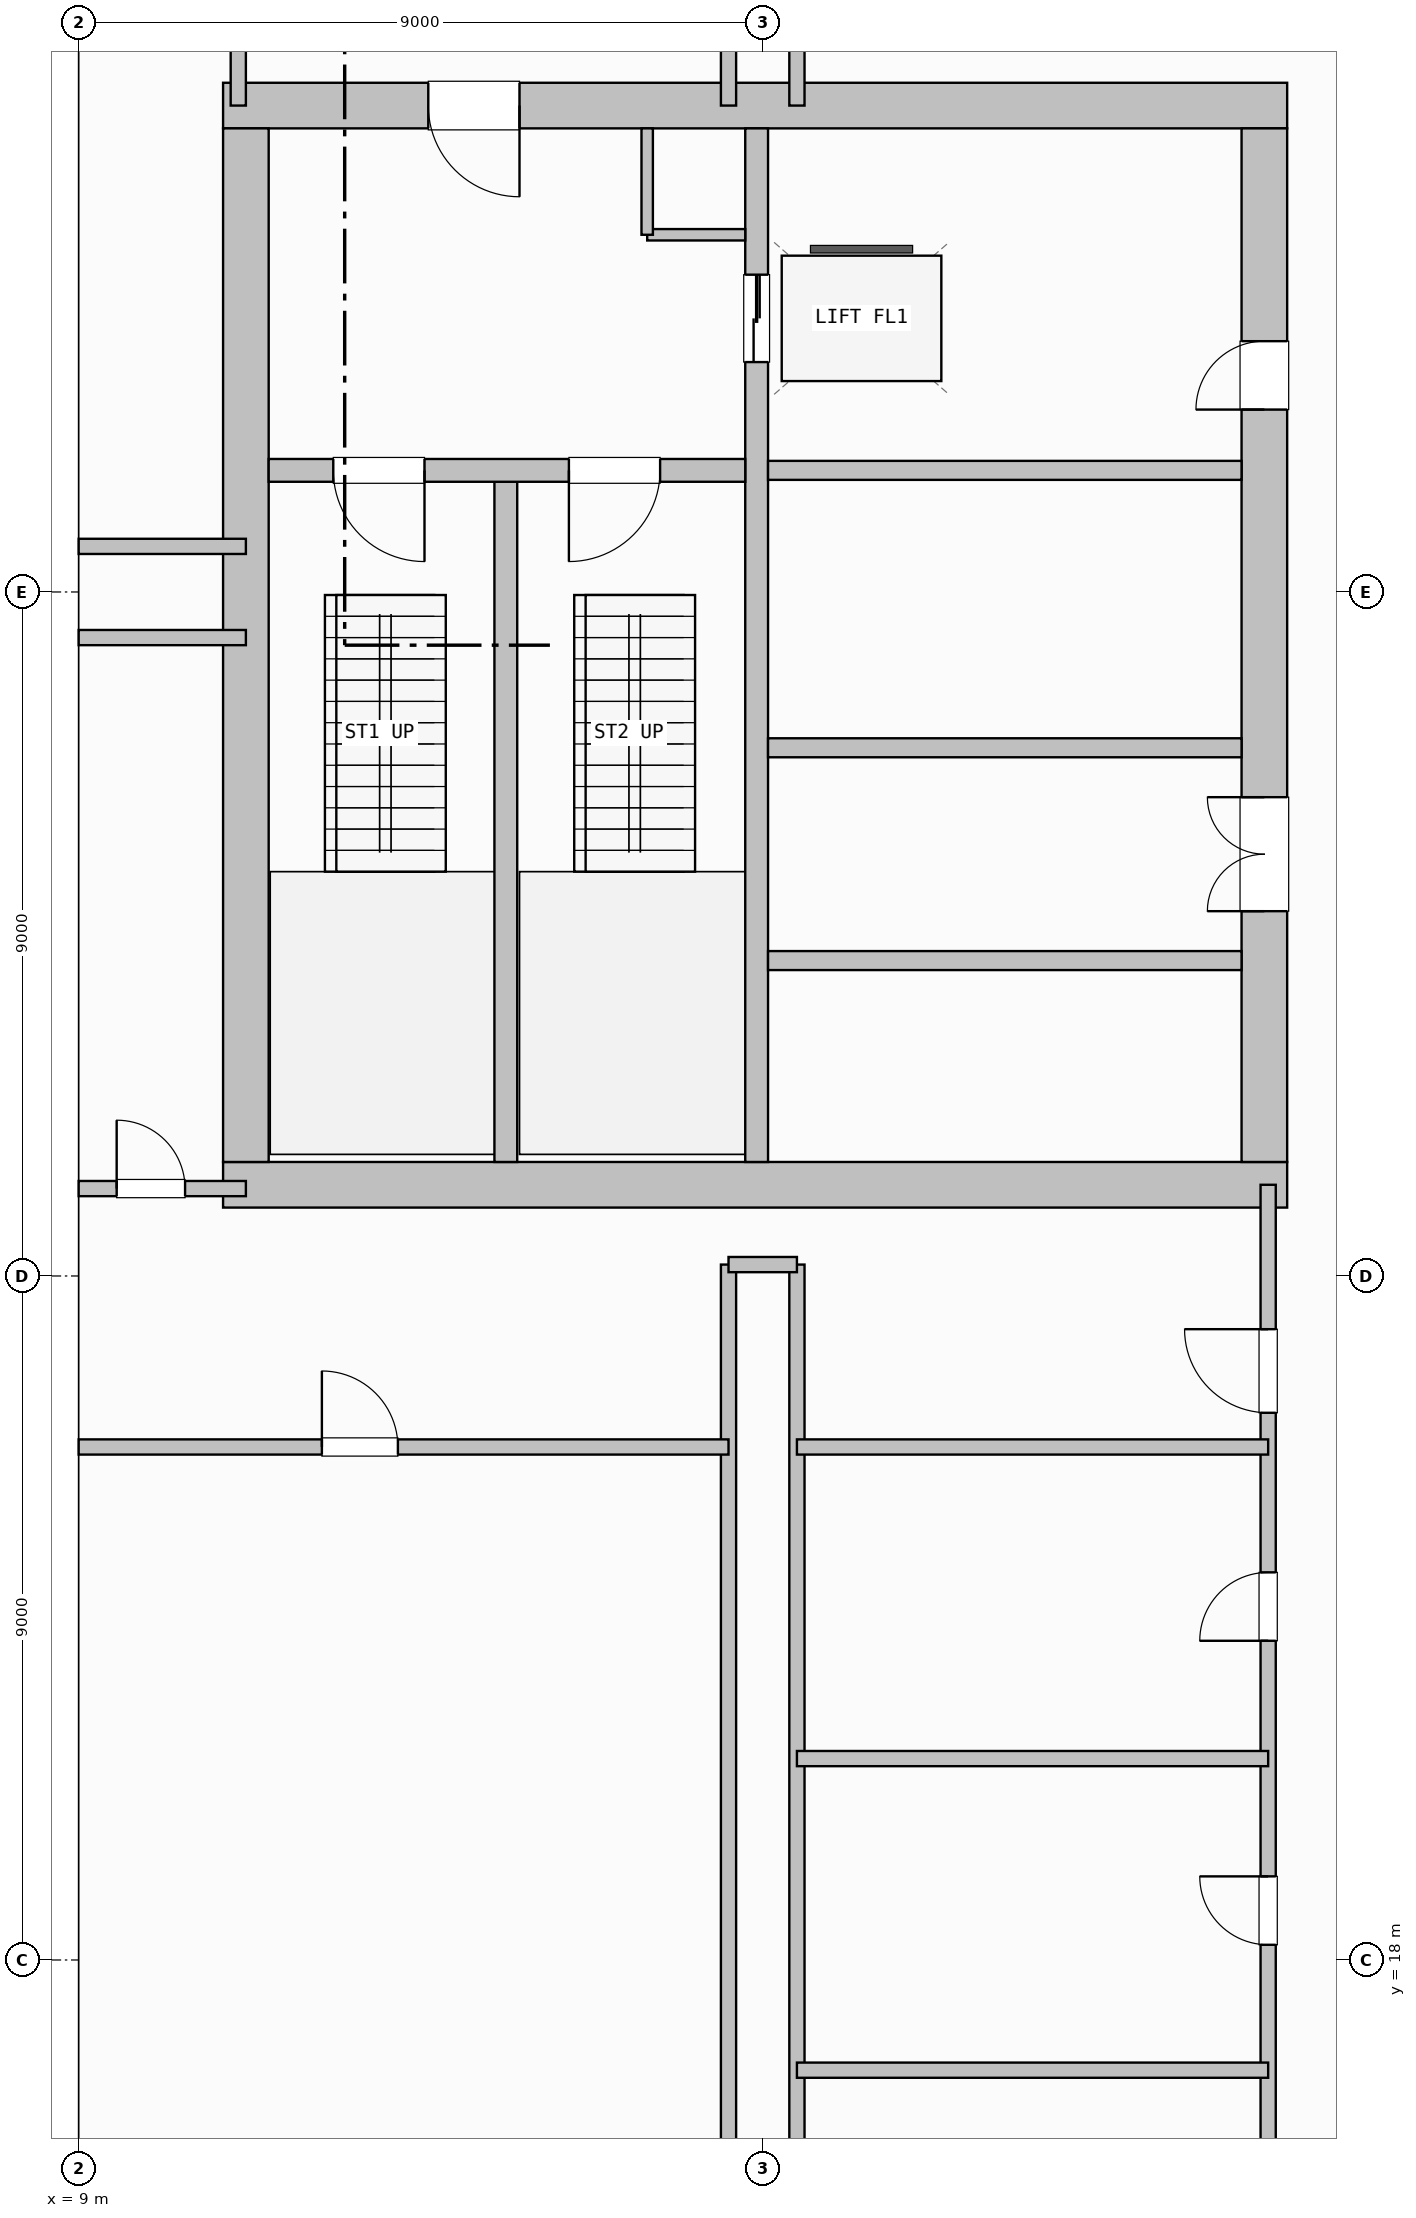
"""IFC4 building model, lengths in metres.
Left out: names, types, materials, properties, quantities, classifications, styles, units other than length and angle.
Written with IfcOpenShell. Run it as: python <this file> out.ifc"""

import sys

from ifc_helpers import new_model, si_unit, direction, frame, frame_2d, origin, origin_2d, place, context, subcontext, project, spatial, rectangle, i_section, extrude, element, fill, save


model = new_model("IFC4")
c1 = context("Model", 3, precision=1e-05, world=origin(), true_north=direction((0.0, 1.0)))
c2 = subcontext(c1, "Body", "Model", "MODEL_VIEW")
j1 = project(units=[si_unit("LENGTHUNIT", "METRE"), si_unit("PLANEANGLEUNIT", "RADIAN")], contexts=[c1])
p1 = place(None, origin())
s1 = spatial("IfcSite", under=j1, at=p1, CompositionType="ELEMENT")
p2 = place(p1, origin())
s2 = spatial("IfcBuilding", under=s1, at=p2, CompositionType="ELEMENT")
p3 = place(p2, frame((0.0, 0.0, 100.2)))
s3 = spatial("IfcBuildingStorey", under=s2, at=p3, CompositionType="ELEMENT", Elevation=100.2)
for number, where, z_axis, x_axis in (
    (1, (9.0, 18.0, 0.0), (0.0, 0.0, 1.0), (1.0, 0.0, 0.0)),
    (2, (9.0, 27.0, 0.0), (0.0, 0.0, 1.0), (1.0, 0.0, 0.0)),
    (3, (9.0, 36.0, 0.0), (0.0, 0.0, 1.0), (1.0, 0.0, 0.0)),
    (4, (18.0, 18.0, 0.0), (0.0, 0.0, 1.0), (1.0, 0.0, 0.0)),
    (5, (18.0, 27.0, 0.0), (0.0, 0.0, 1.0), (1.0, 0.0, 0.0)),
):
    element("IfcColumn", number, at=place(p3, frame(where, z_axis=z_axis, x_axis=x_axis)), inside=s3, PredefinedType="COLUMN", context=c2, shape_type="SweptSolid", body=[
        extrude(i_section(OverallWidth=0.424, OverallDepth=0.474, WebThickness=0.048, FlangeThickness=0.077, FilletRadius=0.015, at=origin_2d()), origin(), (0.0, 0.0, 1.0), 4.8),
    ])
p4 = place(p3, frame((10.9, 28.2, 0.0), z_axis=(0.0, 0.0, 1.0), x_axis=(1.0, 0.0, 0.0)))
e6 = element("IfcWall", 6, at=p4, inside=s3, PredefinedType="SHEAR", context=c2, shape_type="SweptSolid", body=[
    extrude(rectangle(XDim=14.0, YDim=0.6, at=frame_2d((7.0, 0.0))), origin(), (0.0, 0.0, 1.0), 4.47),
])
p5 = place(p3, frame((24.9, 42.4, 0.0), z_axis=(0.0, 0.0, 1.0), x_axis=(-1.0, 0.0, 0.0)))
e7 = element("IfcWall", 7, at=p5, inside=s3, PredefinedType="SHEAR", context=c2, shape_type="SweptSolid", body=[
    extrude(rectangle(XDim=14.0, YDim=0.6, at=frame_2d((7.0, 0.0))), origin(), (0.0, 0.0, 1.0), 4.47),
])
p6 = place(p5, frame((10.1, 0.0, 0.0)))
e8 = element("IfcOpeningElement", 8, at=p6, cuts=e7, PredefinedType="OPENING", context=c2, shape_type="SweptSolid", body=[
    extrude(rectangle(XDim=1.2, YDim=2.15, at=frame_2d((0.6, 1.075))), frame((0.0, 0.31, 0.0), z_axis=(0.0, -1.0, 0.0), x_axis=(1.0, 0.0, 0.0)), (0.0, 0.0, 1.0), 0.62),
])
p7 = place(p3, frame((11.2, 42.1, 0.0), z_axis=(0.0, 0.0, 1.0), x_axis=(0.0, -1.0, 0.0)))
e9 = element("IfcWall", 9, at=p7, inside=s3, PredefinedType="SHEAR", context=c2, shape_type="SweptSolid", body=[
    extrude(rectangle(XDim=13.6, YDim=0.6, at=frame_2d((6.8, 0.0))), origin(), (0.0, 0.0, 1.0), 4.47),
])
p8 = place(p3, frame((24.6, 28.5, 0.0), z_axis=(0.0, 0.0, 1.0), x_axis=(0.0, 1.0, 0.0)))
e10 = element("IfcWall", 10, at=p8, inside=s3, PredefinedType="SHEAR", context=c2, shape_type="SweptSolid", body=[
    extrude(rectangle(XDim=13.6, YDim=0.6, at=frame_2d((6.8, 0.0))), origin(), (0.0, 0.0, 1.0), 4.47),
])
p9 = place(p8, frame((3.3, 0.0, 0.0)))
e11 = element("IfcOpeningElement", 11, at=p9, cuts=e10, PredefinedType="OPENING", context=c2, shape_type="SweptSolid", body=[
    extrude(rectangle(XDim=1.5, YDim=2.2, at=frame_2d((0.75, 1.1))), frame((0.0, 0.31, 0.0), z_axis=(0.0, -1.0, 0.0), x_axis=(1.0, 0.0, 0.0)), (0.0, 0.0, 1.0), 0.62),
])
p10 = place(p8, frame((9.9, 0.0, 0.0)))
e12 = element("IfcOpeningElement", 12, at=p10, cuts=e10, PredefinedType="OPENING", context=c2, shape_type="SweptSolid", body=[
    extrude(rectangle(XDim=0.9, YDim=2.1, at=frame_2d((0.45, 1.05))), frame((0.0, 0.31, 0.0), z_axis=(0.0, -1.0, 0.0), x_axis=(1.0, 0.0, 0.0)), (0.0, 0.0, 1.0), 0.62),
])
p11 = place(p3, frame((14.62, 28.5, 0.0), z_axis=(0.0, 0.0, 1.0), x_axis=(0.0, 1.0, 0.0)))
e13 = element("IfcWall", 13, at=p11, inside=s3, PredefinedType="SHEAR", context=c2, shape_type="SweptSolid", body=[
    extrude(rectangle(XDim=8.95, YDim=0.3, at=frame_2d((4.475, 0.0))), origin(), (0.0, 0.0, 1.0), 4.47),
])
p12 = place(p3, frame((17.92, 42.1, 0.0), z_axis=(0.0, 0.0, 1.0), x_axis=(0.0, -1.0, 0.0)))
e14 = element("IfcWall", 14, at=p12, inside=s3, PredefinedType="SHEAR", context=c2, shape_type="SweptSolid", body=[
    extrude(rectangle(XDim=13.6, YDim=0.3, at=frame_2d((6.8, 0.0))), origin(), (0.0, 0.0, 1.0), 4.47),
])
p13 = place(p12, frame((1.925, 0.0, 0.0)))
e15 = element("IfcOpeningElement", 15, at=p13, cuts=e14, PredefinedType="OPENING", context=c2, shape_type="SweptSolid", body=[
    extrude(rectangle(XDim=1.15, YDim=2.15, at=frame_2d((0.575, 1.075))), frame((0.0, 0.16, 0.0), z_axis=(0.0, -1.0, 0.0), x_axis=(1.0, 0.0, 0.0)), (0.0, 0.0, 1.0), 0.32),
])
p14 = place(p3, frame((17.77, 37.6, 0.0), z_axis=(0.0, 0.0, 1.0), x_axis=(-1.0, 0.0, 0.0)))
e16 = element("IfcWall", 16, at=p14, inside=s3, PredefinedType="SHEAR", context=c2, shape_type="SweptSolid", body=[
    extrude(rectangle(XDim=6.27, YDim=0.3, at=frame_2d((3.135, 0.0))), origin(), (0.0, 0.0, 1.0), 4.47),
])
p15 = place(p14, frame((4.22, 0.0, 0.0)))
e17 = element("IfcOpeningElement", 17, at=p15, cuts=e16, PredefinedType="OPENING", context=c2, shape_type="SweptSolid", body=[
    extrude(rectangle(XDim=1.2, YDim=2.15, at=frame_2d((0.6, 1.075))), frame((0.0, 0.16, 0.0), z_axis=(0.0, -1.0, 0.0), x_axis=(1.0, 0.0, 0.0)), (0.0, 0.0, 1.0), 0.32),
])
p16 = place(p14, frame((1.12, 0.0, 0.0)))
e18 = element("IfcOpeningElement", 18, at=p16, cuts=e16, PredefinedType="OPENING", context=c2, shape_type="SweptSolid", body=[
    extrude(rectangle(XDim=1.2, YDim=2.15, at=frame_2d((0.6, 1.075))), frame((0.0, 0.16, 0.0), z_axis=(0.0, -1.0, 0.0), x_axis=(1.0, 0.0, 0.0)), (0.0, 0.0, 1.0), 0.32),
])
p17 = place(p3, frame((16.48, 40.7, 0.0), z_axis=(0.0, 0.0, 1.0), x_axis=(1.0, 0.0, 0.0)))
e19 = element("IfcWall", 19, at=p17, inside=s3, PredefinedType="PARTITIONING", context=c2, shape_type="SweptSolid", body=[
    extrude(rectangle(XDim=1.29, YDim=0.15, at=frame_2d((0.645, 0.0))), origin(), (0.0, 0.0, 1.0), 4.47),
])
p18 = place(p3, frame((16.48, 40.7, 0.0), z_axis=(0.0, 0.0, 1.0), x_axis=(0.0, 1.0, 0.0)))
e20 = element("IfcWall", 20, at=p18, inside=s3, PredefinedType="PARTITIONING", context=c2, shape_type="SweptSolid", body=[
    extrude(rectangle(XDim=1.4, YDim=0.15, at=frame_2d((0.7, 0.0))), origin(), (0.0, 0.0, 1.0), 4.47),
])
for number, where, z_axis, x_axis in (
    (21, (18.07, 37.6, 0.0), (0.0, 0.0, 1.0), (1.0, 0.0, 0.0)),
    (22, (18.07, 31.15, 0.0), (0.0, 0.0, 1.0), (1.0, 0.0, 0.0)),
    (23, (24.3, 33.95, 0.0), (0.0, 0.0, 1.0), (-1.0, 0.0, 0.0)),
):
    element("IfcWall", number, at=place(p3, frame(where, z_axis=z_axis, x_axis=x_axis)), inside=s3, PredefinedType="PARTITIONING", context=c2, shape_type="SweptSolid", body=[
        extrude(rectangle(XDim=6.23, YDim=0.25, at=frame_2d((3.115, 0.0))), origin(), (0.0, 0.0, 1.0), 4.47),
    ])
p19 = place(p3, frame((24.65, 9.0, 0.0), z_axis=(0.0, 0.0, 1.0), x_axis=(0.0, 1.0, 0.0)))
e24 = element("IfcWall", 24, at=p19, inside=s3, PredefinedType="PARTITIONING", context=c2, shape_type="SweptSolid", body=[
    extrude(rectangle(XDim=19.2, YDim=0.2, at=frame_2d((9.6, 0.0))), origin(), (0.0, 0.0, 1.0), 3.677),
])
p20 = place(p19, frame((4.2, 0.0, 0.0)))
e25 = element("IfcOpeningElement", 25, at=p20, cuts=e24, PredefinedType="OPENING", context=c2, shape_type="SweptSolid", body=[
    extrude(rectangle(XDim=1.1, YDim=2.15, at=frame_2d((0.55, 1.075))), frame((0.0, 0.11, 0.0), z_axis=(0.0, -1.0, 0.0), x_axis=(1.0, 0.0, 0.0)), (0.0, 0.0, 1.0), 0.22),
])
p21 = place(p19, frame((16.2, 0.0, 0.0)))
e26 = element("IfcOpeningElement", 26, at=p21, cuts=e24, PredefinedType="OPENING", context=c2, shape_type="SweptSolid", body=[
    extrude(rectangle(XDim=1.1, YDim=2.15, at=frame_2d((0.55, 1.075))), frame((0.0, 0.11, 0.0), z_axis=(0.0, -1.0, 0.0), x_axis=(1.0, 0.0, 0.0)), (0.0, 0.0, 1.0), 0.22),
])
p22 = place(p19, frame((9.2, 0.0, 0.0)))
e27 = element("IfcOpeningElement", 27, at=p22, cuts=e24, PredefinedType="OPENING", context=c2, shape_type="SweptSolid", body=[
    extrude(rectangle(XDim=0.9, YDim=2.1, at=frame_2d((0.45, 1.05))), frame((0.0, 0.11, 0.0), z_axis=(0.0, -1.0, 0.0), x_axis=(1.0, 0.0, 0.0)), (0.0, 0.0, 1.0), 0.22),
])
p23 = place(p19, frame((13.2, 0.0, 0.0)))
e28 = element("IfcOpeningElement", 28, at=p23, cuts=e24, PredefinedType="OPENING", context=c2, shape_type="SweptSolid", body=[
    extrude(rectangle(XDim=0.9, YDim=2.1, at=frame_2d((0.45, 1.05))), frame((0.0, 0.11, 0.0), z_axis=(0.0, -1.0, 0.0), x_axis=(1.0, 0.0, 0.0)), (0.0, 0.0, 1.0), 0.22),
])
p24 = place(p3, frame((17.55, 9.0, 0.0), z_axis=(0.0, 0.0, 1.0), x_axis=(0.0, 1.0, 0.0)))
e29 = element("IfcWall", 29, at=p24, inside=s3, PredefinedType="PARTITIONING", context=c2, shape_type="SweptSolid", body=[
    extrude(rectangle(XDim=18.15, YDim=0.2, at=frame_2d((9.075, 0.0))), origin(), (0.0, 0.0, 1.0), 3.839),
])
p25 = place(p3, frame((18.45, 9.0, 0.0), z_axis=(0.0, 0.0, 1.0), x_axis=(0.0, 1.0, 0.0)))
e30 = element("IfcWall", 30, at=p25, inside=s3, PredefinedType="PARTITIONING", context=c2, shape_type="SweptSolid", body=[
    extrude(rectangle(XDim=18.15, YDim=0.2, at=frame_2d((9.075, 0.0))), origin(), (0.0, 0.0, 1.0), 3.677),
])
p26 = place(p3, frame((17.55, 27.15, 0.0), z_axis=(0.0, 0.0, 1.0), x_axis=(1.0, 0.0, 0.0)))
e31 = element("IfcWall", 31, at=p26, inside=s3, PredefinedType="PARTITIONING", context=c2, shape_type="SweptSolid", body=[
    extrude(rectangle(XDim=0.9, YDim=0.2, at=frame_2d((0.45, 0.0))), origin(), (0.0, 0.0, 1.0), 3.839),
])
p27 = place(p3, frame((9.0, 24.75, 0.0), z_axis=(0.0, 0.0, 1.0), x_axis=(1.0, 0.0, 0.0)))
e32 = element("IfcWall", 32, at=p27, inside=s3, PredefinedType="PARTITIONING", context=c2, shape_type="SweptSolid", body=[
    extrude(rectangle(XDim=8.55, YDim=0.2, at=frame_2d((4.275, 0.0))), origin(), (0.0, 0.0, 1.0), 3.677),
])
p28 = place(p27, frame((3.2, 0.0, 0.0)))
e33 = element("IfcOpeningElement", 33, at=p28, cuts=e32, PredefinedType="OPENING", context=c2, shape_type="SweptSolid", body=[
    extrude(rectangle(XDim=1.0, YDim=2.15, at=frame_2d((0.5, 1.075))), frame((0.0, 0.11, 0.0), z_axis=(0.0, -1.0, 0.0), x_axis=(1.0, 0.0, 0.0)), (0.0, 0.0, 1.0), 0.22),
])
for number, where, z_axis, x_axis in (
    (34, (18.45, 24.75, 0.0), (0.0, 0.0, 1.0), (1.0, 0.0, 0.0)),
    (35, (18.45, 16.55, 0.0), (0.0, 0.0, 1.0), (1.0, 0.0, 0.0)),
    (36, (18.45, 20.65, 0.0), (0.0, 0.0, 1.0), (1.0, 0.0, 0.0)),
):
    element("IfcWall", number, at=place(p3, frame(where, z_axis=z_axis, x_axis=x_axis)), inside=s3, PredefinedType="PARTITIONING", context=c2, shape_type="SweptSolid", body=[
        extrude(rectangle(XDim=6.2, YDim=0.2, at=frame_2d((3.1, 0.0))), origin(), (0.0, 0.0, 1.0), 4.47),
    ])
p29 = place(p3, frame((9.0, 28.15, 0.0), z_axis=(0.0, 0.0, 1.0), x_axis=(1.0, 0.0, 0.0)))
e37 = element("IfcWall", 37, at=p29, inside=s3, PredefinedType="PARTITIONING", context=c2, shape_type="SweptSolid", body=[
    extrude(rectangle(XDim=2.2, YDim=0.2, at=frame_2d((1.1, 0.0))), origin(), (0.0, 0.0, 1.0), 3.677),
])
p30 = place(p29, frame((0.5, 0.0, 0.0)))
e38 = element("IfcOpeningElement", 38, at=p30, cuts=e37, PredefinedType="OPENING", context=c2, shape_type="SweptSolid", body=[
    extrude(rectangle(XDim=0.9, YDim=2.1, at=frame_2d((0.45, 1.05))), frame((0.0, 0.11, 0.0), z_axis=(0.0, -1.0, 0.0), x_axis=(1.0, 0.0, 0.0)), (0.0, 0.0, 1.0), 0.22),
])
for number, where, z_axis, x_axis in (
    (39, (9.0, 35.4, 0.0), (0.0, 0.0, 1.0), (1.0, 0.0, 0.0)),
    (40, (9.0, 36.6, 0.0), (0.0, 0.0, 1.0), (1.0, 0.0, 0.0)),
):
    element("IfcWall", number, at=place(p3, frame(where, z_axis=z_axis, x_axis=x_axis)), inside=s3, PredefinedType="PARTITIONING", context=c2, shape_type="SweptSolid", body=[
        extrude(rectangle(XDim=2.2, YDim=0.2, at=frame_2d((1.1, 0.0))), origin(), (0.0, 0.0, 1.0), 3.677),
    ])
for number, where, z_axis, x_axis in (
    (41, (17.55, 42.4, 0.0), (0.0, 0.0, 1.0), (0.0, 1.0, 0.0)),
    (42, (18.45, 42.4, 0.0), (0.0, 0.0, 1.0), (0.0, 1.0, 0.0)),
):
    element("IfcWall", number, at=place(p3, frame(where, z_axis=z_axis, x_axis=x_axis)), inside=s3, PredefinedType="PARTITIONING", context=c2, shape_type="SweptSolid", body=[
        extrude(rectangle(XDim=2.8, YDim=0.2, at=frame_2d((1.4, 0.0))), origin(), (0.0, 0.0, 1.0), 3.839),
    ])
p31 = place(p3, frame((11.1, 42.4, 0.0), z_axis=(0.0, 0.0, 1.0), x_axis=(0.0, 1.0, 0.0)))
e43 = element("IfcWall", 43, at=p31, inside=s3, PredefinedType="PARTITIONING", context=c2, shape_type="SweptSolid", body=[
    extrude(rectangle(XDim=2.1, YDim=0.2, at=frame_2d((1.05, 0.0))), origin(), (0.0, 0.0, 1.0), 4.47),
])
p32 = place(p15, origin())
e44 = element("IfcDoor", 44, at=p32, inside=s3, OperationType="SINGLE_SWING_LEFT", PredefinedType="DOOR", context=c2, shape_type="SweptSolid", body=[
    extrude(rectangle(XDim=1.2, YDim=2.15, at=frame_2d((0.6, 1.075))), frame((0.0, 0.025, 0.0), z_axis=(0.0, -1.0, 0.0), x_axis=(1.0, 0.0, 0.0)), (0.0, 0.0, 1.0), 0.05),
])
fill(e17, e44)
p33 = place(p16, origin())
e45 = element("IfcDoor", 45, at=p33, inside=s3, OperationType="SINGLE_SWING_RIGHT", PredefinedType="DOOR", context=c2, shape_type="SweptSolid", body=[
    extrude(rectangle(XDim=1.2, YDim=2.15, at=frame_2d((0.6, 1.075))), frame((0.0, 0.025, 0.0), z_axis=(0.0, -1.0, 0.0), x_axis=(1.0, 0.0, 0.0)), (0.0, 0.0, 1.0), 0.05),
])
fill(e18, e45)
p34 = place(p9, origin())
e46 = element("IfcDoor", 46, at=p34, inside=s3, OperationType="DOUBLE_DOOR_SINGLE_SWING", PredefinedType="DOOR", context=c2, shape_type="SweptSolid", body=[
    extrude(rectangle(XDim=1.5, YDim=2.2, at=frame_2d((0.75, 1.1))), frame((0.0, 0.025, 0.0), z_axis=(0.0, -1.0, 0.0), x_axis=(1.0, 0.0, 0.0)), (0.0, 0.0, 1.0), 0.05),
])
fill(e11, e46)
p35 = place(p6, origin())
e47 = element("IfcDoor", 47, at=p35, inside=s3, OperationType="SINGLE_SWING_LEFT", PredefinedType="DOOR", context=c2, shape_type="SweptSolid", body=[
    extrude(rectangle(XDim=1.2, YDim=2.15, at=frame_2d((0.6, 1.075))), frame((0.0, 0.025, 0.0), z_axis=(0.0, -1.0, 0.0), x_axis=(1.0, 0.0, 0.0)), (0.0, 0.0, 1.0), 0.05),
])
fill(e8, e47)
p36 = place(p10, origin())
e48 = element("IfcDoor", 48, at=p36, inside=s3, OperationType="SINGLE_SWING_LEFT", PredefinedType="DOOR", context=c2, shape_type="SweptSolid", body=[
    extrude(rectangle(XDim=0.9, YDim=2.1, at=frame_2d((0.45, 1.05))), frame((0.0, 0.025, 0.0), z_axis=(0.0, -1.0, 0.0), x_axis=(1.0, 0.0, 0.0)), (0.0, 0.0, 1.0), 0.05),
])
fill(e12, e48)
p37 = place(p13, origin())
e49 = element("IfcDoor", 49, at=p37, inside=s3, OperationType="DOUBLE_DOOR_SLIDING", PredefinedType="DOOR", context=c2, shape_type="SweptSolid", body=[
    extrude(rectangle(XDim=1.15, YDim=2.15, at=frame_2d((0.575, 1.075))), frame((0.0, 0.025, 0.0), z_axis=(0.0, -1.0, 0.0), x_axis=(1.0, 0.0, 0.0)), (0.0, 0.0, 1.0), 0.05),
])
fill(e15, e49)
p38 = place(p28, origin())
e50 = element("IfcDoor", 50, at=p38, inside=s3, OperationType="SINGLE_SWING_LEFT", PredefinedType="DOOR", context=c2, shape_type="SweptSolid", body=[
    extrude(rectangle(XDim=1.0, YDim=2.15, at=frame_2d((0.5, 1.075))), frame((0.0, 0.025, 0.0), z_axis=(0.0, -1.0, 0.0), x_axis=(1.0, 0.0, 0.0)), (0.0, 0.0, 1.0), 0.05),
])
fill(e33, e50)
p39 = place(p21, origin())
e51 = element("IfcDoor", 51, at=p39, inside=s3, OperationType="SINGLE_SWING_RIGHT", PredefinedType="DOOR", context=c2, shape_type="SweptSolid", body=[
    extrude(rectangle(XDim=1.1, YDim=2.15, at=frame_2d((0.55, 1.075))), frame((0.0, 0.025, 0.0), z_axis=(0.0, -1.0, 0.0), x_axis=(1.0, 0.0, 0.0)), (0.0, 0.0, 1.0), 0.05),
])
fill(e26, e51)
p40 = place(p30, origin())
e52 = element("IfcDoor", 52, at=p40, inside=s3, OperationType="SINGLE_SWING_LEFT", PredefinedType="DOOR", context=c2, shape_type="SweptSolid", body=[
    extrude(rectangle(XDim=0.9, YDim=2.1, at=frame_2d((0.45, 1.05))), frame((0.0, 0.025, 0.0), z_axis=(0.0, -1.0, 0.0), x_axis=(1.0, 0.0, 0.0)), (0.0, 0.0, 1.0), 0.05),
])
fill(e38, e52)
p41 = place(p22, origin())
e53 = element("IfcDoor", 53, at=p41, inside=s3, OperationType="SINGLE_SWING_RIGHT", PredefinedType="DOOR", context=c2, shape_type="SweptSolid", body=[
    extrude(rectangle(XDim=0.9, YDim=2.1, at=frame_2d((0.45, 1.05))), frame((0.0, 0.025, 0.0), z_axis=(0.0, -1.0, 0.0), x_axis=(1.0, 0.0, 0.0)), (0.0, 0.0, 1.0), 0.05),
])
fill(e27, e53)
p42 = place(p23, origin())
e54 = element("IfcDoor", 54, at=p42, inside=s3, OperationType="SINGLE_SWING_LEFT", PredefinedType="DOOR", context=c2, shape_type="SweptSolid", body=[
    extrude(rectangle(XDim=0.9, YDim=2.1, at=frame_2d((0.45, 1.05))), frame((0.0, 0.025, 0.0), z_axis=(0.0, -1.0, 0.0), x_axis=(1.0, 0.0, 0.0)), (0.0, 0.0, 1.0), 0.05),
])
fill(e28, e54)
save(model, sys.argv[1])
